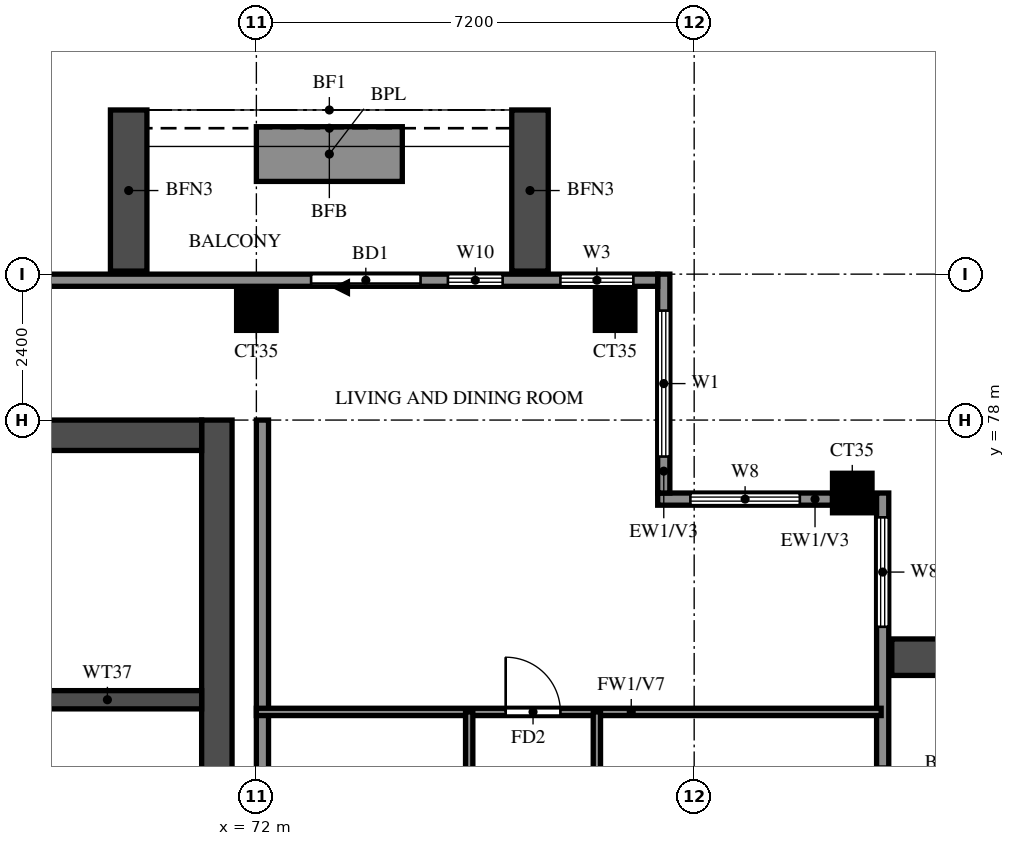
"""IFC4 building model, lengths in metres.
Left out: names, types, materials, properties, quantities, classifications, styles, units other than length and angle.
Written with IfcOpenShell. Run it as: python <this file> out.ifc"""

import sys

from ifc_helpers import new_model, si_unit, direction, frame, frame_2d, origin, origin_2d, place, context, subcontext, project, spatial, rectangle, extrude, source, transform, mapped, element, fill, save


model = new_model("IFC4")
c1 = context("Model", 3, precision=1e-05, world=origin(), true_north=direction((0.0, 1.0)))
c2 = subcontext(c1, "Body", "Model", "MODEL_VIEW")
j1 = project(units=[si_unit("LENGTHUNIT", "METRE"), si_unit("PLANEANGLEUNIT", "RADIAN")], contexts=[c1])
p1 = place(None, origin())
s1 = spatial("IfcSite", under=j1, at=p1, CompositionType="ELEMENT")
p2 = place(p1, origin())
s2 = spatial("IfcBuilding", under=s1, at=p2, CompositionType="ELEMENT")
p3 = place(p2, frame((0.0, 0.0, 236.0)))
s3 = spatial("IfcBuildingStorey", under=s2, at=p3, CompositionType="ELEMENT", Elevation=236.0)
m1 = source(origin(), c2, "Body", "SweptSolid", [
    extrude(rectangle(XDim=0.65, YDim=0.65, at=origin_2d()), origin(), (0.0, 0.0, 1.0), 3.22),
])
for number, where, z_axis, x_axis in (
    (1, (81.8, 76.8, 0.0), (0.0, 0.0, 1.0), (1.0, 0.0, 0.0)),
    (2, (72.0, 79.8, 0.0), (0.0, 0.0, 1.0), (1.0, 0.0, 0.0)),
    (3, (77.9, 79.8, 0.0), (0.0, 0.0, 1.0), (1.0, 0.0, 0.0)),
):
    element("IfcColumn", number, at=place(p3, frame(where, z_axis=z_axis, x_axis=x_axis)), inside=s3, PredefinedType="COLUMN", context=c2, shape_type="MappedRepresentation", body=[
        mapped(m1, transform((0.0, 0.0, 0.0))),
    ])
p4 = place(p3, frame((71.35, 66.15, 0.0), z_axis=(0.0, 0.0, 1.0), x_axis=(0.0, 1.0, 0.0)))
e4 = element("IfcWall", 4, at=p4, inside=s3, PredefinedType="SHEAR", context=c2, shape_type="SweptSolid", body=[
    extrude(rectangle(XDim=11.85, YDim=0.5, at=frame_2d((5.925, 0.0))), origin(), (0.0, 0.0, 1.0), 3.22),
])
p5 = place(p3, frame((29.7, 77.75, 0.0), z_axis=(0.0, 0.0, 1.0), x_axis=(1.0, 0.0, 0.0)))
e5 = element("IfcWall", 5, at=p5, inside=s3, PredefinedType="SHEAR", context=c2, shape_type="SweptSolid", body=[
    extrude(rectangle(XDim=41.4, YDim=0.5, at=frame_2d((20.7, 0.0))), origin(), (0.0, 0.0, 1.0), 3.22),
])
p6 = place(p3, frame((68.0, 73.4, 0.0), z_axis=(0.0, 0.0, 1.0), x_axis=(1.0, 0.0, 0.0)))
e6 = element("IfcWall", 6, at=p6, inside=s3, PredefinedType="SHEAR", context=c2, shape_type="SweptSolid", body=[
    extrude(rectangle(XDim=3.1, YDim=0.3, at=frame_2d((1.55, 0.0))), origin(), (0.0, 0.0, 1.0), 3.22),
])
p7 = place(p3, frame((82.3, 48.2, 0.0), z_axis=(0.0, 0.0, 1.0), x_axis=(0.0, 1.0, 0.0)))
e7 = element("IfcWall", 7, at=p7, inside=s3, PredefinedType="SOLIDWALL", context=c2, shape_type="SweptSolid", body=[
    extrude(rectangle(XDim=28.6, YDim=0.2, at=frame_2d((14.3, 0.0))), origin(), (0.0, 0.0, 1.0), 3.22),
])
p8 = place(p7, frame((22.3, 0.0, 0.0)))
e8 = element("IfcOpeningElement", 8, at=p8, cuts=e7, PredefinedType="OPENING", context=c2, shape_type="SweptSolid", body=[
    extrude(rectangle(XDim=1.8, YDim=2.4, at=frame_2d((0.9, 1.2))), frame((0.0, 0.11, 0.0), z_axis=(0.0, -1.0, 0.0), x_axis=(1.0, 0.0, 0.0)), (0.0, 0.0, 1.0), 0.22),
])
p9 = place(p7, frame((0.9, 0.0, 0.6)))
e9 = element("IfcOpeningElement", 9, at=p9, cuts=e7, PredefinedType="OPENING", context=c2, shape_type="SweptSolid", body=[
    extrude(rectangle(XDim=2.4, YDim=2.4, at=frame_2d((1.2, 1.2))), frame((0.0, 0.11, 0.0), z_axis=(0.0, -1.0, 0.0), x_axis=(1.0, 0.0, 0.0)), (0.0, 0.0, 1.0), 0.22),
])
p10 = place(p7, frame((3.9, 0.0, 0.6)))
e10 = element("IfcOpeningElement", 10, at=p10, cuts=e7, PredefinedType="OPENING", context=c2, shape_type="SweptSolid", body=[
    extrude(rectangle(XDim=2.4, YDim=2.4, at=frame_2d((1.2, 1.2))), frame((0.0, 0.11, 0.0), z_axis=(0.0, -1.0, 0.0), x_axis=(1.0, 0.0, 0.0)), (0.0, 0.0, 1.0), 0.22),
])
p11 = place(p7, frame((11.2, 0.0, 0.6)))
e11 = element("IfcOpeningElement", 11, at=p11, cuts=e7, PredefinedType="OPENING", context=c2, shape_type="SweptSolid", body=[
    extrude(rectangle(XDim=2.4, YDim=2.4, at=frame_2d((1.2, 1.2))), frame((0.0, 0.11, 0.0), z_axis=(0.0, -1.0, 0.0), x_axis=(1.0, 0.0, 0.0)), (0.0, 0.0, 1.0), 0.22),
])
p12 = place(p7, frame((8.35, 0.0, 1.5)))
e12 = element("IfcOpeningElement", 12, at=p12, cuts=e7, PredefinedType="OPENING", context=c2, shape_type="SweptSolid", body=[
    extrude(rectangle(XDim=0.9, YDim=0.9, at=frame_2d((0.45, 0.45))), frame((0.0, 0.11, 0.0), z_axis=(0.0, -1.0, 0.0), x_axis=(1.0, 0.0, 0.0)), (0.0, 0.0, 1.0), 0.22),
])
p13 = place(p7, frame((14.8, 0.0, 0.6)))
e13 = element("IfcOpeningElement", 13, at=p13, cuts=e7, PredefinedType="OPENING", context=c2, shape_type="SweptSolid", body=[
    extrude(rectangle(XDim=2.4, YDim=2.4, at=frame_2d((1.2, 1.2))), frame((0.0, 0.11, 0.0), z_axis=(0.0, -1.0, 0.0), x_axis=(1.0, 0.0, 0.0)), (0.0, 0.0, 1.0), 0.22),
])
p14 = place(p7, frame((17.95, 0.0, 1.5)))
e14 = element("IfcOpeningElement", 14, at=p14, cuts=e7, PredefinedType="OPENING", context=c2, shape_type="SweptSolid", body=[
    extrude(rectangle(XDim=0.9, YDim=0.9, at=frame_2d((0.45, 0.45))), frame((0.0, 0.11, 0.0), z_axis=(0.0, -1.0, 0.0), x_axis=(1.0, 0.0, 0.0)), (0.0, 0.0, 1.0), 0.22),
])
p15 = place(p7, frame((20.05, 0.0, 1.5)))
e15 = element("IfcOpeningElement", 15, at=p15, cuts=e7, PredefinedType="OPENING", context=c2, shape_type="SweptSolid", body=[
    extrude(rectangle(XDim=0.9, YDim=0.9, at=frame_2d((0.45, 0.45))), frame((0.0, 0.11, 0.0), z_axis=(0.0, -1.0, 0.0), x_axis=(1.0, 0.0, 0.0)), (0.0, 0.0, 1.0), 0.22),
])
p16 = place(p7, frame((26.4, 0.0, 0.6)))
e16 = element("IfcOpeningElement", 16, at=p16, cuts=e7, PredefinedType="OPENING", context=c2, shape_type="SweptSolid", body=[
    extrude(rectangle(XDim=1.8, YDim=2.4, at=frame_2d((0.9, 1.2))), frame((0.0, 0.11, 0.0), z_axis=(0.0, -1.0, 0.0), x_axis=(1.0, 0.0, 0.0)), (0.0, 0.0, 1.0), 0.22),
])
p17 = place(p3, frame((81.475, 76.7, 0.0), z_axis=(0.0, 0.0, 1.0), x_axis=(-1.0, 0.0, 0.0)))
e17 = element("IfcWall", 17, at=p17, inside=s3, PredefinedType="SOLIDWALL", context=c2, shape_type="SweptSolid", body=[
    extrude(rectangle(XDim=2.875, YDim=0.2, at=frame_2d((1.438, 0.0))), origin(), (0.0, 0.0, 1.0), 3.22),
])
p18 = place(p17, frame((0.538, 0.0, 0.6)))
e18 = element("IfcOpeningElement", 18, at=p18, cuts=e17, PredefinedType="OPENING", context=c2, shape_type="SweptSolid", body=[
    extrude(rectangle(XDim=1.8, YDim=2.4, at=frame_2d((0.9, 1.2))), frame((0.0, 0.11, 0.0), z_axis=(0.0, -1.0, 0.0), x_axis=(1.0, 0.0, 0.0)), (0.0, 0.0, 1.0), 0.22),
])
p19 = place(p3, frame((78.7, 76.8, 0.0), z_axis=(0.0, 0.0, 1.0), x_axis=(0.0, 1.0, 0.0)))
e19 = element("IfcWall", 19, at=p19, inside=s3, PredefinedType="SOLIDWALL", context=c2, shape_type="SweptSolid", body=[
    extrude(rectangle(XDim=3.6, YDim=0.2, at=frame_2d((1.8, 0.0))), origin(), (0.0, 0.0, 1.0), 3.22),
])
p20 = place(p19, frame((0.6, 0.0, 0.6)))
e20 = element("IfcOpeningElement", 20, at=p20, cuts=e19, PredefinedType="OPENING", context=c2, shape_type="SweptSolid", body=[
    extrude(rectangle(XDim=2.4, YDim=2.4, at=frame_2d((1.2, 1.2))), frame((0.0, 0.11, 0.0), z_axis=(0.0, -1.0, 0.0), x_axis=(1.0, 0.0, 0.0)), (0.0, 0.0, 1.0), 0.22),
])
p21 = place(p3, frame((78.6, 80.3, 0.0), z_axis=(0.0, 0.0, 1.0), x_axis=(-1.0, 0.0, 0.0)))
e21 = element("IfcWall", 21, at=p21, inside=s3, PredefinedType="SOLIDWALL", context=c2, shape_type="SweptSolid", body=[
    extrude(rectangle(XDim=56.6, YDim=0.2, at=frame_2d((28.3, 0.0))), origin(), (0.0, 0.0, 1.0), 3.22),
])
p22 = place(p21, frame((3.9, 0.0, 0.0)))
e22 = element("IfcOpeningElement", 22, at=p22, cuts=e21, PredefinedType="OPENING", context=c2, shape_type="SweptSolid", body=[
    extrude(rectangle(XDim=1.8, YDim=2.4, at=frame_2d((0.9, 1.2))), frame((0.0, 0.11, 0.0), z_axis=(0.0, -1.0, 0.0), x_axis=(1.0, 0.0, 0.0)), (0.0, 0.0, 1.0), 0.22),
])
p23 = place(p21, frame((50.433, 0.0, 0.6)))
e23 = element("IfcOpeningElement", 23, at=p23, cuts=e21, PredefinedType="OPENING", context=c2, shape_type="SweptSolid", body=[
    extrude(rectangle(XDim=2.4, YDim=2.4, at=frame_2d((1.2, 1.2))), frame((0.0, 0.11, 0.0), z_axis=(0.0, -1.0, 0.0), x_axis=(1.0, 0.0, 0.0)), (0.0, 0.0, 1.0), 0.22),
])
p24 = place(p21, frame((53.367, 0.0, 0.6)))
e24 = element("IfcOpeningElement", 24, at=p24, cuts=e21, PredefinedType="OPENING", context=c2, shape_type="SweptSolid", body=[
    extrude(rectangle(XDim=2.4, YDim=2.4, at=frame_2d((1.2, 1.2))), frame((0.0, 0.11, 0.0), z_axis=(0.0, -1.0, 0.0), x_axis=(1.0, 0.0, 0.0)), (0.0, 0.0, 1.0), 0.22),
])
p25 = place(p21, frame((0.4, 0.0, 0.6)))
e25 = element("IfcOpeningElement", 25, at=p25, cuts=e21, PredefinedType="OPENING", context=c2, shape_type="SweptSolid", body=[
    extrude(rectangle(XDim=1.2, YDim=2.4, at=frame_2d((0.6, 1.2))), frame((0.0, 0.11, 0.0), z_axis=(0.0, -1.0, 0.0), x_axis=(1.0, 0.0, 0.0)), (0.0, 0.0, 1.0), 0.22),
])
p26 = place(p21, frame((2.55, 0.0, 0.6)))
e26 = element("IfcOpeningElement", 26, at=p26, cuts=e21, PredefinedType="OPENING", context=c2, shape_type="SweptSolid", body=[
    extrude(rectangle(XDim=0.9, YDim=2.4, at=frame_2d((0.45, 1.2))), frame((0.0, 0.11, 0.0), z_axis=(0.0, -1.0, 0.0), x_axis=(1.0, 0.0, 0.0)), (0.0, 0.0, 1.0), 0.22),
])
for number, where, z_axis, x_axis in (
    (27, (82.45, 74.1, 0.0), (0.0, 0.0, 1.0), (1.0, 0.0, 0.0)),
    (28, (76.5, 80.45, 0.0), (0.0, 0.0, 1.0), (0.0, 1.0, 0.0)),
    (29, (69.9, 80.45, 0.0), (0.0, 0.0, 1.0), (0.0, 1.0, 0.0)),
):
    element("IfcWall", number, at=place(p3, frame(where, z_axis=z_axis, x_axis=x_axis)), inside=s3, PredefinedType="SOLIDWALL", context=c2, shape_type="SweptSolid", body=[
        extrude(rectangle(XDim=2.65, YDim=0.6, at=frame_2d((1.325, 0.0))), origin(), (0.0, 0.0, 1.0), 2.85),
    ])
p27 = place(p3, frame((74.4, 82.375, 0.0), z_axis=(0.0, 0.0, 1.0), x_axis=(-1.0, 0.0, 0.0)))
e30 = element("IfcWall", 30, at=p27, inside=s3, PredefinedType="SOLIDWALL", context=c2, shape_type="SweptSolid", body=[
    extrude(rectangle(XDim=2.4, YDim=0.9, at=frame_2d((1.2, 0.0))), origin(), (0.0, 0.0, 1.0), 0.9),
])
p28 = place(p3, frame((72.1, 62.4, 0.0), z_axis=(0.0, 0.0, 1.0), x_axis=(0.0, 1.0, 0.0)))
e31 = element("IfcWall", 31, at=p28, inside=s3, PredefinedType="SOLIDWALL", context=c2, shape_type="SweptSolid", body=[
    extrude(rectangle(XDim=15.6, YDim=0.2, at=frame_2d((7.8, 0.0))), origin(), (0.0, 0.0, 1.0), 3.22),
])
p29 = place(p3, frame((72.0, 73.2, 0.0), z_axis=(0.0, 0.0, 1.0), x_axis=(1.0, 0.0, 0.0)))
e32 = element("IfcWall", 32, at=p29, inside=s3, PredefinedType="PARTITIONING", context=c2, shape_type="SweptSolid", body=[
    extrude(rectangle(XDim=10.275, YDim=0.12, at=frame_2d((5.137, 0.0))), origin(), (0.0, 0.0, 1.0), 2.32),
])
p30 = place(p29, frame((4.1, 0.0, 0.0)))
e33 = element("IfcOpeningElement", 33, at=p30, cuts=e32, PredefinedType="OPENING", context=c2, shape_type="SweptSolid", body=[
    extrude(rectangle(XDim=0.9, YDim=2.1, at=frame_2d((0.45, 1.05))), frame((0.0, 0.07, 0.0), z_axis=(0.0, -1.0, 0.0), x_axis=(1.0, 0.0, 0.0)), (0.0, 0.0, 1.0), 0.14),
])
p31 = place(p3, frame((75.5, 64.8, 0.0), z_axis=(0.0, 0.0, 1.0), x_axis=(0.0, 1.0, 0.0)))
e34 = element("IfcWall", 34, at=p31, inside=s3, PredefinedType="PARTITIONING", context=c2, shape_type="SweptSolid", body=[
    extrude(rectangle(XDim=8.4, YDim=0.12, at=frame_2d((4.2, 0.0))), origin(), (0.0, 0.0, 1.0), 3.22),
])
p32 = place(p31, frame((1.925, 0.0, 0.0)))
e35 = element("IfcOpeningElement", 35, at=p32, cuts=e34, PredefinedType="OPENING", context=c2, shape_type="SweptSolid", body=[
    extrude(rectangle(XDim=0.9, YDim=2.1, at=frame_2d((0.45, 1.05))), frame((0.0, 0.07, 0.0), z_axis=(0.0, -1.0, 0.0), x_axis=(1.0, 0.0, 0.0)), (0.0, 0.0, 1.0), 0.14),
])
p33 = place(p31, frame((6.125, 0.0, 0.0)))
e36 = element("IfcOpeningElement", 36, at=p33, cuts=e34, PredefinedType="OPENING", context=c2, shape_type="SweptSolid", body=[
    extrude(rectangle(XDim=0.9, YDim=2.1, at=frame_2d((0.45, 1.05))), frame((0.0, 0.07, 0.0), z_axis=(0.0, -1.0, 0.0), x_axis=(1.0, 0.0, 0.0)), (0.0, 0.0, 1.0), 0.14),
])
p34 = place(p3, frame((77.6, 69.6, 0.0), z_axis=(0.0, 0.0, 1.0), x_axis=(0.0, 1.0, 0.0)))
e37 = element("IfcWall", 37, at=p34, inside=s3, PredefinedType="PARTITIONING", context=c2, shape_type="SweptSolid", body=[
    extrude(rectangle(XDim=3.6, YDim=0.12, at=frame_2d((1.8, 0.0))), origin(), (0.0, 0.0, 1.0), 3.22),
])
p35 = place(p34, frame((1.35, 0.0, 0.0)))
e38 = element("IfcOpeningElement", 38, at=p35, cuts=e37, PredefinedType="OPENING", context=c2, shape_type="SweptSolid", body=[
    extrude(rectangle(XDim=0.9, YDim=2.1, at=frame_2d((0.45, 1.05))), frame((0.0, 0.07, 0.0), z_axis=(0.0, -1.0, 0.0), x_axis=(1.0, 0.0, 0.0)), (0.0, 0.0, 1.0), 0.14),
])
p36 = place(p16, origin())
e39 = element("IfcWindow", 39, at=p36, inside=s3, PartitioningType="DOUBLE_PANEL_VERTICAL", PredefinedType="WINDOW", context=c2, shape_type="SweptSolid", body=[
    extrude(rectangle(XDim=1.8, YDim=2.4, at=frame_2d((0.9, 1.2))), frame((0.0, 0.03, 0.0), z_axis=(0.0, -1.0, 0.0), x_axis=(1.0, 0.0, 0.0)), (0.0, 0.0, 1.0), 0.06),
])
fill(e16, e39)
p37 = place(p18, origin())
e40 = element("IfcWindow", 40, at=p37, inside=s3, PartitioningType="DOUBLE_PANEL_VERTICAL", PredefinedType="WINDOW", context=c2, shape_type="SweptSolid", body=[
    extrude(rectangle(XDim=1.8, YDim=2.4, at=frame_2d((0.9, 1.2))), frame((0.0, 0.03, 0.0), z_axis=(0.0, -1.0, 0.0), x_axis=(1.0, 0.0, 0.0)), (0.0, 0.0, 1.0), 0.06),
])
fill(e18, e40)
p38 = place(p20, origin())
e41 = element("IfcWindow", 41, at=p38, inside=s3, PartitioningType="DOUBLE_PANEL_VERTICAL", PredefinedType="WINDOW", context=c2, shape_type="SweptSolid", body=[
    extrude(rectangle(XDim=2.4, YDim=2.4, at=frame_2d((1.2, 1.2))), frame((0.0, 0.03, 0.0), z_axis=(0.0, -1.0, 0.0), x_axis=(1.0, 0.0, 0.0)), (0.0, 0.0, 1.0), 0.06),
])
fill(e20, e41)
p39 = place(p22, origin())
e42 = element("IfcDoor", 42, at=p39, inside=s3, OperationType="DOUBLE_DOOR_SLIDING", PredefinedType="DOOR", context=c2, shape_type="SweptSolid", body=[
    extrude(rectangle(XDim=1.8, YDim=2.4, at=frame_2d((0.9, 1.2))), frame((0.0, 0.025, 0.0), z_axis=(0.0, -1.0, 0.0), x_axis=(1.0, 0.0, 0.0)), (0.0, 0.0, 1.0), 0.05),
])
fill(e22, e42)
p40 = place(p25, origin())
e43 = element("IfcWindow", 43, at=p40, inside=s3, PartitioningType="SINGLE_PANEL", PredefinedType="WINDOW", context=c2, shape_type="SweptSolid", body=[
    extrude(rectangle(XDim=1.2, YDim=2.4, at=frame_2d((0.6, 1.2))), frame((0.0, 0.03, 0.0), z_axis=(0.0, -1.0, 0.0), x_axis=(1.0, 0.0, 0.0)), (0.0, 0.0, 1.0), 0.06),
])
fill(e25, e43)
p41 = place(p26, origin())
e44 = element("IfcWindow", 44, at=p41, inside=s3, PartitioningType="SINGLE_PANEL", PredefinedType="WINDOW", context=c2, shape_type="SweptSolid", body=[
    extrude(rectangle(XDim=0.9, YDim=2.4, at=frame_2d((0.45, 1.2))), frame((0.0, 0.03, 0.0), z_axis=(0.0, -1.0, 0.0), x_axis=(1.0, 0.0, 0.0)), (0.0, 0.0, 1.0), 0.06),
])
fill(e26, e44)
p42 = place(p30, origin())
e45 = element("IfcDoor", 45, at=p42, inside=s3, OperationType="SINGLE_SWING_LEFT", PredefinedType="DOOR", context=c2, shape_type="SweptSolid", body=[
    extrude(rectangle(XDim=0.9, YDim=2.1, at=frame_2d((0.45, 1.05))), frame((0.0, 0.025, 0.0), z_axis=(0.0, -1.0, 0.0), x_axis=(1.0, 0.0, 0.0)), (0.0, 0.0, 1.0), 0.05),
])
fill(e33, e45)
save(model, sys.argv[1])
